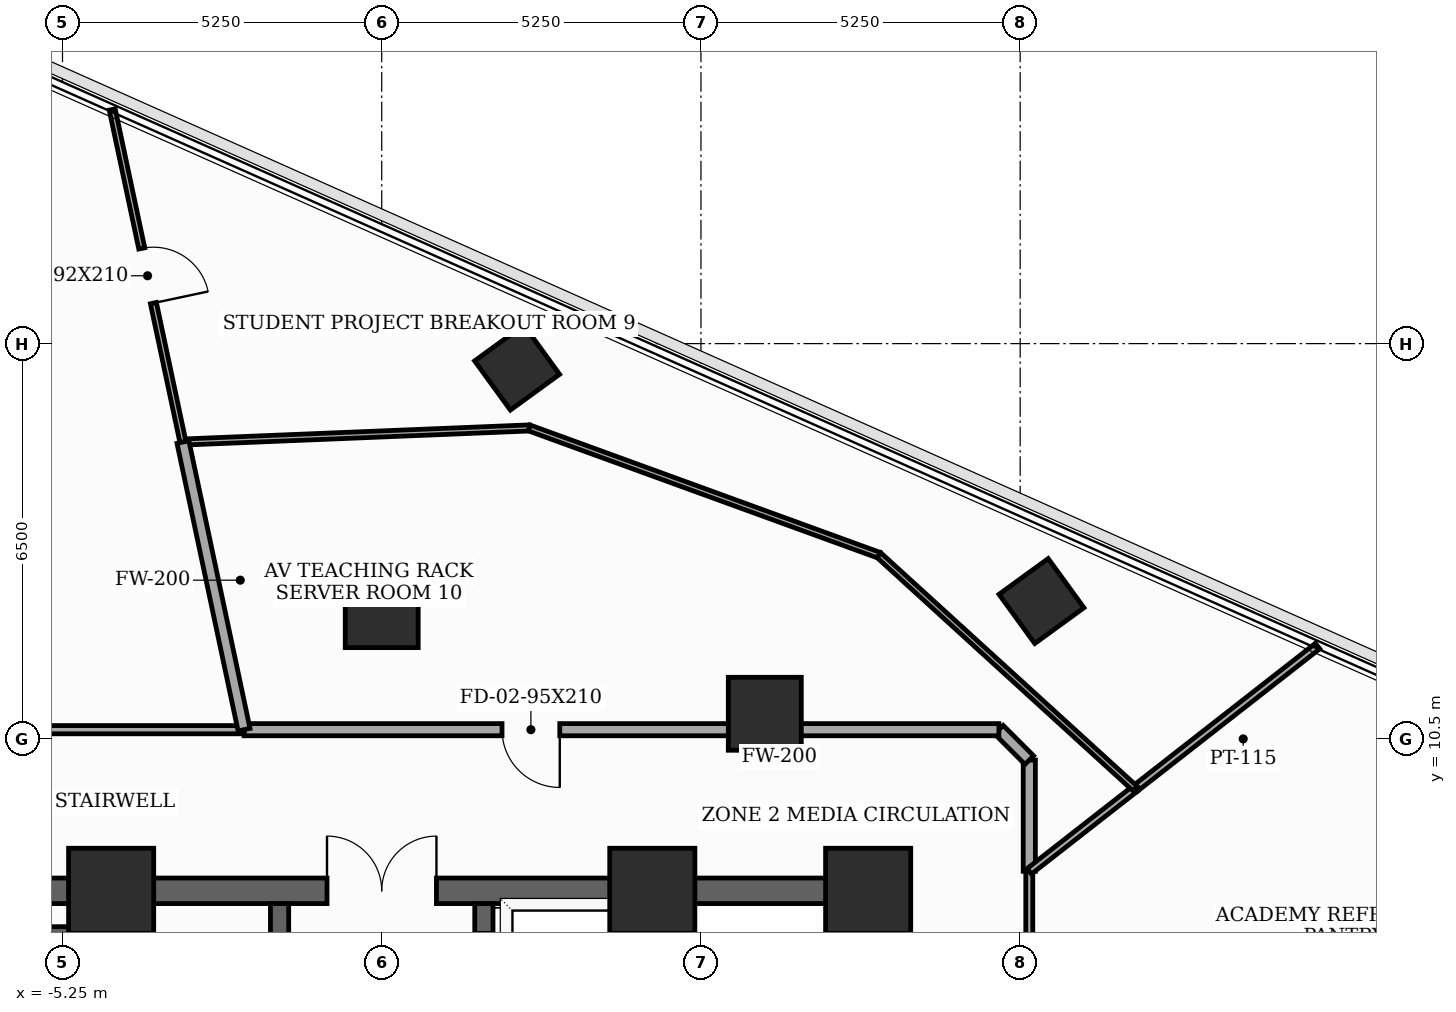
"""IFC4 building model, lengths in metres.
Left out: names, types, materials, properties, quantities, classifications, styles, units other than length and angle.
Written with IfcOpenShell. Run it as: python <this file> out.ifc"""

import sys

from ifc_helpers import new_model, si_unit, direction, frame, frame_2d, origin, origin_2d, place, context, subcontext, project, spatial, rectangle, extrude, element, fill, save


model = new_model("IFC4")
c1 = context("Model", 3, precision=1e-05, world=origin(), true_north=direction((0.0, 1.0)))
c2 = subcontext(c1, "Body", "Model", "MODEL_VIEW")
j1 = project(units=[si_unit("LENGTHUNIT", "METRE"), si_unit("PLANEANGLEUNIT", "RADIAN")], contexts=[c1])
p1 = place(None, origin())
s1 = spatial("IfcSite", under=j1, at=p1, CompositionType="ELEMENT")
p2 = place(p1, origin())
s2 = spatial("IfcBuilding", under=s1, at=p2, CompositionType="ELEMENT")
p3 = place(p2, frame((0.0, 0.0, 169.4)))
s3 = spatial("IfcBuildingStorey", under=s2, at=p3, CompositionType="ELEMENT", Elevation=169.4)
for number, where, z_axis, x_axis in (
    (1, (8.0, 8.0, 0.0), (0.0, 0.0, 1.0), (1.0, 0.0, 0.0)),
    (2, (4.45, 8.0, 0.0), (0.0, 0.0, 1.0), (1.0, 0.0, 0.0)),
    (3, (-4.45, 8.0, 0.0), (0.0, 0.0, 1.0), (1.0, 0.0, 0.0)),
):
    element("IfcColumn", number, at=place(p3, frame(where, z_axis=z_axis, x_axis=x_axis)), inside=s3, PredefinedType="COLUMN", context=c2, shape_type="SweptSolid", body=[
        extrude(rectangle(XDim=1.4, YDim=1.4, at=origin_2d()), origin(), (0.0, 0.0, 1.0), 3.7),
    ])
for number, where, z_axis, x_axis in (
    (4, (6.3, 10.912, 0.0), (0.0, 0.0, 1.0), (1.0, 0.0, 0.0)),
    (5, (0.0, 12.6, 0.0), (0.0, 0.0, 1.0), (1.0, 0.0, 0.0)),
):
    element("IfcColumn", number, at=place(p3, frame(where, z_axis=z_axis, x_axis=x_axis)), inside=s3, PredefinedType="COLUMN", context=c2, shape_type="SweptSolid", body=[
        extrude(rectangle(XDim=1.2, YDim=1.2, at=origin_2d()), origin(), (0.0, 0.0, 1.0), 3.7),
    ])
for number, where, z_axis, x_axis in (
    (6, (10.85, 12.766, 0.0), (0.0, 0.0, 1.0), (0.809, 0.588, 0.0)),
    (7, (2.227, 16.605, 0.0), (0.0, 0.0, 1.0), (0.809, 0.588, 0.0)),
):
    element("IfcColumn", number, at=place(p3, frame(where, z_axis=z_axis, x_axis=x_axis)), inside=s3, PredefinedType="COLUMN", context=c2, shape_type="SweptSolid", body=[
        extrude(rectangle(XDim=1.0, YDim=1.0, at=origin_2d()), origin(), (0.0, 0.0, 1.0), 3.7),
    ])
p4 = place(p3, frame((8.0, -8.0, 0.0), z_axis=(0.0, 0.0, 1.0), x_axis=(0.0, 1.0, 0.0)))
e8 = element("IfcWall", 8, at=p4, inside=s3, PredefinedType="SHEAR", context=c2, shape_type="SweptSolid", body=[
    extrude(rectangle(XDim=16.0, YDim=0.42, at=frame_2d((8.0, 0.0))), origin(), (0.0, 0.0, 1.0), 3.5),
])
p5 = place(p4, frame((9.6, 0.0, 0.0)))
e9 = element("IfcOpeningElement", 9, at=p5, cuts=e8, PredefinedType="OPENING", context=c2, shape_type="SweptSolid", body=[
    extrude(rectangle(XDim=1.05, YDim=2.15, at=frame_2d((0.525, 1.075))), frame((0.0, 0.22, 0.0), z_axis=(0.0, -1.0, 0.0), x_axis=(1.0, 0.0, 0.0)), (0.0, 0.0, 1.0), 0.44),
])
p6 = place(p4, frame((14.229, 0.0, 0.0)))
e10 = element("IfcOpeningElement", 10, at=p6, cuts=e8, PredefinedType="OPENING", context=c2, shape_type="SweptSolid", body=[
    extrude(rectangle(XDim=0.85, YDim=2.02, at=frame_2d((0.425, 1.01))), frame((0.0, 0.22, 0.0), z_axis=(0.0, -1.0, 0.0), x_axis=(1.0, 0.0, 0.0)), (0.0, 0.0, 1.0), 0.44),
])
p7 = place(p3, frame((-8.0, 8.0, 0.0), z_axis=(0.0, 0.0, 1.0), x_axis=(1.0, 0.0, 0.0)))
e11 = element("IfcWall", 11, at=p7, inside=s3, PredefinedType="SHEAR", context=c2, shape_type="SweptSolid", body=[
    extrude(rectangle(XDim=16.0, YDim=0.42, at=frame_2d((8.0, 0.0))), origin(), (0.0, 0.0, 1.0), 3.5),
])
p8 = place(p7, frame((7.1, 0.0, 0.0)))
e12 = element("IfcOpeningElement", 12, at=p8, cuts=e11, PredefinedType="OPENING", context=c2, shape_type="SweptSolid", body=[
    extrude(rectangle(XDim=1.8, YDim=2.15, at=frame_2d((0.9, 1.075))), frame((0.0, 0.22, 0.0), z_axis=(0.0, -1.0, 0.0), x_axis=(1.0, 0.0, 0.0)), (0.0, 0.0, 1.0), 0.44),
])
for number, where, z_axis, x_axis in (
    (13, (-4.45, -7.79, 0.0), (0.0, 0.0, 1.0), (0.0, 1.0, 0.0)),
    (14, (4.45, -7.79, 0.0), (0.0, 0.0, 1.0), (0.0, 1.0, 0.0)),
):
    element("IfcWall", number, at=place(p3, frame(where, z_axis=z_axis, x_axis=x_axis)), inside=s3, PredefinedType="SHEAR", context=c2, shape_type="SweptSolid", body=[
        extrude(rectangle(XDim=15.58, YDim=0.3, at=frame_2d((7.79, 0.0))), origin(), (0.0, 0.0, 1.0), 3.5),
    ])
p9 = place(p3, frame((-7.79, 7.26, 0.0), z_axis=(0.0, 0.0, 1.0), x_axis=(1.0, 0.0, 0.0)))
e15 = element("IfcWall", 15, at=p9, inside=s3, PredefinedType="SHEAR", context=c2, shape_type="SweptSolid", body=[
    extrude(rectangle(XDim=3.34, YDim=0.3, at=frame_2d((1.67, 0.0))), origin(), (0.0, 0.0, 1.0), 3.5),
])
p10 = place(p3, frame((-1.68, -4.85, 0.0), z_axis=(0.0, 0.0, 1.0), x_axis=(0.0, 1.0, 0.0)))
e16 = element("IfcWall", 16, at=p10, inside=s3, PredefinedType="SHEAR", context=c2, shape_type="SweptSolid", body=[
    extrude(rectangle(XDim=12.64, YDim=0.3, at=frame_2d((6.32, 0.0))), origin(), (0.0, 0.0, 1.0), 3.5),
])
p11 = place(p10, frame((3.5, 0.0, 0.0)))
e17 = element("IfcOpeningElement", 17, at=p11, cuts=e16, PredefinedType="OPENING", context=c2, shape_type="SweptSolid", body=[
    extrude(rectangle(XDim=0.95, YDim=2.1, at=frame_2d((0.475, 1.05))), frame((0.0, 0.16, 0.0), z_axis=(0.0, -1.0, 0.0), x_axis=(1.0, 0.0, 0.0)), (0.0, 0.0, 1.0), 0.32),
])
p12 = place(p10, frame((9.8, 0.0, 0.0)))
e18 = element("IfcOpeningElement", 18, at=p12, cuts=e16, PredefinedType="OPENING", context=c2, shape_type="SweptSolid", body=[
    extrude(rectangle(XDim=0.95, YDim=2.1, at=frame_2d((0.475, 1.05))), frame((0.0, 0.16, 0.0), z_axis=(0.0, -1.0, 0.0), x_axis=(1.0, 0.0, 0.0)), (0.0, 0.0, 1.0), 0.32),
])
p13 = place(p3, frame((1.68, -4.85, 0.0), z_axis=(0.0, 0.0, 1.0), x_axis=(0.0, 1.0, 0.0)))
e19 = element("IfcWall", 19, at=p13, inside=s3, PredefinedType="SHEAR", context=c2, shape_type="SweptSolid", body=[
    extrude(rectangle(XDim=12.64, YDim=0.3, at=frame_2d((6.32, 0.0))), origin(), (0.0, 0.0, 1.0), 3.5),
])
p14 = place(p13, frame((0.55, 0.0, 0.0)))
e20 = element("IfcOpeningElement", 20, at=p14, cuts=e19, PredefinedType="OPENING", context=c2, shape_type="SweptSolid", body=[
    extrude(rectangle(XDim=1.1, YDim=2.1, at=frame_2d((0.55, 1.05))), frame((0.0, 0.16, 0.0), z_axis=(0.0, -1.0, 0.0), x_axis=(1.0, 0.0, 0.0)), (0.0, 0.0, 1.0), 0.32),
])
p15 = place(p13, frame((2.65, 0.0, 0.0)))
e21 = element("IfcOpeningElement", 21, at=p15, cuts=e19, PredefinedType="OPENING", context=c2, shape_type="SweptSolid", body=[
    extrude(rectangle(XDim=1.1, YDim=2.1, at=frame_2d((0.55, 1.05))), frame((0.0, 0.16, 0.0), z_axis=(0.0, -1.0, 0.0), x_axis=(1.0, 0.0, 0.0)), (0.0, 0.0, 1.0), 0.32),
])
p16 = place(p13, frame((4.75, 0.0, 0.0)))
e22 = element("IfcOpeningElement", 22, at=p16, cuts=e19, PredefinedType="OPENING", context=c2, shape_type="SweptSolid", body=[
    extrude(rectangle(XDim=1.1, YDim=2.1, at=frame_2d((0.55, 1.05))), frame((0.0, 0.16, 0.0), z_axis=(0.0, -1.0, 0.0), x_axis=(1.0, 0.0, 0.0)), (0.0, 0.0, 1.0), 0.32),
])
p17 = place(p13, frame((6.85, 0.0, 0.0)))
e23 = element("IfcOpeningElement", 23, at=p17, cuts=e19, PredefinedType="OPENING", context=c2, shape_type="SweptSolid", body=[
    extrude(rectangle(XDim=1.1, YDim=2.1, at=frame_2d((0.55, 1.05))), frame((0.0, 0.16, 0.0), z_axis=(0.0, -1.0, 0.0), x_axis=(1.0, 0.0, 0.0)), (0.0, 0.0, 1.0), 0.32),
])
p18 = place(p13, frame((8.95, 0.0, 0.0)))
e24 = element("IfcOpeningElement", 24, at=p18, cuts=e19, PredefinedType="OPENING", context=c2, shape_type="SweptSolid", body=[
    extrude(rectangle(XDim=1.1, YDim=2.1, at=frame_2d((0.55, 1.05))), frame((0.0, 0.16, 0.0), z_axis=(0.0, -1.0, 0.0), x_axis=(1.0, 0.0, 0.0)), (0.0, 0.0, 1.0), 0.32),
])
p19 = place(p13, frame((11.05, 0.0, 0.0)))
e25 = element("IfcOpeningElement", 25, at=p19, cuts=e19, PredefinedType="OPENING", context=c2, shape_type="SweptSolid", body=[
    extrude(rectangle(XDim=1.1, YDim=2.1, at=frame_2d((0.55, 1.05))), frame((0.0, 0.16, 0.0), z_axis=(0.0, -1.0, 0.0), x_axis=(1.0, 0.0, 0.0)), (0.0, 0.0, 1.0), 0.32),
])
p20 = place(p3, frame((10.65, 2.264, 0.0), z_axis=(0.0, 0.0, 1.0), x_axis=(0.0, 1.0, 0.0)))
e26 = element("IfcWall", 26, at=p20, inside=s3, PredefinedType="PARTITIONING", context=c2, shape_type="SweptSolid", body=[
    extrude(rectangle(XDim=6.057, YDim=0.115, at=frame_2d((3.029, 0.0))), origin(), (0.0, 0.0, 1.0), 2.885),
])
p21 = place(p20, frame((0.736, 0.0, 0.0)))
e27 = element("IfcOpeningElement", 27, at=p21, cuts=e26, PredefinedType="OPENING", context=c2, shape_type="SweptSolid", body=[
    extrude(rectangle(XDim=0.95, YDim=2.1, at=frame_2d((0.475, 1.05))), frame((0.0, 0.067, 0.0), z_axis=(0.0, -1.0, 0.0), x_axis=(1.0, 0.0, 0.0)), (0.0, 0.0, 1.0), 0.135),
])
p22 = place(p3, frame((10.65, 8.321, 0.0), z_axis=(0.0, 0.0, 1.0), x_axis=(0.0, 1.0, 0.0)))
e28 = element("IfcWall", 28, at=p22, inside=s3, PredefinedType="SOLIDWALL", context=c2, shape_type="SweptSolid", body=[
    extrude(rectangle(XDim=1.829, YDim=0.2, at=frame_2d((0.915, 0.0))), origin(), (0.0, 0.0, 1.0), 3.5),
])
p23 = place(p3, frame((10.65, 10.15, 0.0), z_axis=(0.0, 0.0, 1.0), x_axis=(-0.707106781187, 0.707106781187, 0.0)))
e29 = element("IfcWall", 29, at=p23, inside=s3, PredefinedType="SOLIDWALL", context=c2, shape_type="SweptSolid", body=[
    extrude(rectangle(XDim=0.707, YDim=0.2, at=frame_2d((0.354, 0.0))), origin(), (0.0, 0.0, 1.0), 3.5),
])
p24 = place(p3, frame((10.15, 10.65, 0.0), z_axis=(0.0, 0.0, 1.0), x_axis=(-1.0, 0.0, 0.0)))
e30 = element("IfcWall", 30, at=p24, inside=s3, PredefinedType="SOLIDWALL", context=c2, shape_type="SweptSolid", body=[
    extrude(rectangle(XDim=12.414, YDim=0.2, at=frame_2d((6.207, 0.0))), origin(), (0.0, 0.0, 1.0), 2.885),
])
p25 = place(p24, frame((7.222, 0.0, 0.0)))
e31 = element("IfcOpeningElement", 31, at=p25, cuts=e30, PredefinedType="OPENING", context=c2, shape_type="SweptSolid", body=[
    extrude(rectangle(XDim=0.95, YDim=2.1, at=frame_2d((0.475, 1.05))), frame((0.0, 0.11, 0.0), z_axis=(0.0, -1.0, 0.0), x_axis=(1.0, 0.0, 0.0)), (0.0, 0.0, 1.0), 0.22),
])
p26 = place(p3, frame((-2.264, 10.65, 0.0), z_axis=(0.0, 0.0, 1.0), x_axis=(-1.0, 0.0, 0.0)))
e32 = element("IfcWall", 32, at=p26, inside=s3, PredefinedType="PARTITIONING", context=c2, shape_type="SweptSolid", body=[
    extrude(rectangle(XDim=7.886, YDim=0.135, at=frame_2d((3.943, 0.0))), origin(), (0.0, 0.0, 1.0), 2.885),
])
p27 = place(p3, frame((15.391, 12.025, 0.0), z_axis=(0.0, 0.0, 1.0), x_axis=(-0.787968951689, -0.615714975597, 0.0)))
e33 = element("IfcWall", 33, at=p27, inside=s3, PredefinedType="PARTITIONING", context=c2, shape_type="SweptSolid", body=[
    extrude(rectangle(XDim=3.807, YDim=0.115, at=frame_2d((1.903, 0.0))), origin(), (0.0, 0.0, 1.0), 2.985),
])
p28 = place(p3, frame((12.391, 9.681, 0.0), z_axis=(0.0, 0.0, 1.0), x_axis=(-0.788124883644, -0.615515367624, 0.0)))
e34 = element("IfcWall", 34, at=p28, inside=s3, PredefinedType="PARTITIONING", context=c2, shape_type="SweptSolid", body=[
    extrude(rectangle(XDim=2.209, YDim=0.115, at=frame_2d((1.104, 0.0))), origin(), (0.0, 0.0, 1.0), 3.5),
])
p29 = place(p3, frame((-3.269, 15.381, 0.0), z_axis=(0.0, 0.0, 1.0), x_axis=(0.999171753478, 0.040691609114, 0.0)))
e35 = element("IfcWall", 35, at=p29, inside=s3, PredefinedType="MOVABLE", context=c2, shape_type="SweptSolid", body=[
    extrude(rectangle(XDim=5.7, YDim=0.1, at=frame_2d((2.85, 0.0))), origin(), (0.0, 0.0, 1.0), 2.885),
])
p30 = place(p3, frame((2.426, 15.613, 0.0), z_axis=(0.0, 0.0, 1.0), x_axis=(0.939701375228, -0.341996089736, 0.0)))
e36 = element("IfcWall", 36, at=p30, inside=s3, PredefinedType="MOVABLE", context=c2, shape_type="SweptSolid", body=[
    extrude(rectangle(XDim=6.12, YDim=0.1, at=frame_2d((3.06, 0.0))), origin(), (0.0, 0.0, 1.0), 3.5),
])
p31 = place(p3, frame((8.177, 13.52, 0.0), z_axis=(0.0, 0.0, 1.0), x_axis=(0.739232344885, -0.673450473514, 0.0)))
e37 = element("IfcWall", 37, at=p31, inside=s3, PredefinedType="MOVABLE", context=c2, shape_type="SweptSolid", body=[
    extrude(rectangle(XDim=5.701, YDim=0.1, at=frame_2d((2.85, 0.0))), origin(), (0.0, 0.0, 1.0), 2.885),
])
p32 = place(p3, frame((-4.432, 20.851, 0.0), z_axis=(0.0, 0.0, 1.0), x_axis=(0.208032106743, -0.978121997792, 0.0)))
e38 = element("IfcWall", 38, at=p32, inside=s3, PredefinedType="MOVABLE", context=c2, shape_type="SweptSolid", body=[
    extrude(rectangle(XDim=5.592, YDim=0.1, at=frame_2d((2.796, 0.0))), origin(), (0.0, 0.0, 1.0), 2.985),
])
p33 = place(p32, frame((2.336, 0.0, 0.0)))
e39 = element("IfcOpeningElement", 39, at=p33, cuts=e38, PredefinedType="OPENING", context=c2, shape_type="SweptSolid", body=[
    extrude(rectangle(XDim=0.92, YDim=2.1, at=frame_2d((0.46, 1.05))), frame((0.0, 0.06, 0.0), z_axis=(0.0, -1.0, 0.0), x_axis=(1.0, 0.0, 0.0)), (0.0, 0.0, 1.0), 0.12),
])
p34 = place(p3, frame((-3.269, 15.381, 0.0), z_axis=(0.0, 0.0, 1.0), x_axis=(0.207808649559, -0.978169497157, 0.0)))
e40 = element("IfcWall", 40, at=p34, inside=s3, PredefinedType="SOLIDWALL", context=c2, shape_type="SweptSolid", body=[
    extrude(rectangle(XDim=4.837, YDim=0.2, at=frame_2d((2.418, 0.0))), origin(), (0.0, 0.0, 1.0), 2.885),
])
p35 = place(p8, origin())
e41 = element("IfcDoor", 41, at=p35, inside=s3, OperationType="DOUBLE_DOOR_SINGLE_SWING", PredefinedType="DOOR", context=c2, shape_type="SweptSolid", body=[
    extrude(rectangle(XDim=1.8, YDim=2.15, at=frame_2d((0.9, 1.075))), frame((0.0, 0.025, 0.0), z_axis=(0.0, -1.0, 0.0), x_axis=(1.0, 0.0, 0.0)), (0.0, 0.0, 1.0), 0.05),
])
fill(e12, e41)
p36 = place(p25, origin())
e42 = element("IfcDoor", 42, at=p36, inside=s3, OperationType="SINGLE_SWING_LEFT", PredefinedType="DOOR", context=c2, shape_type="SweptSolid", body=[
    extrude(rectangle(XDim=0.95, YDim=2.1, at=frame_2d((0.475, 1.05))), frame((0.0, 0.025, 0.0), z_axis=(0.0, -1.0, 0.0), x_axis=(1.0, 0.0, 0.0)), (0.0, 0.0, 1.0), 0.05),
])
fill(e31, e42)
p37 = place(p33, origin())
e43 = element("IfcDoor", 43, at=p37, inside=s3, OperationType="SINGLE_SWING_RIGHT", PredefinedType="DOOR", context=c2, shape_type="SweptSolid", body=[
    extrude(rectangle(XDim=0.92, YDim=2.1, at=frame_2d((0.46, 1.05))), frame((0.0, 0.025, 0.0), z_axis=(0.0, -1.0, 0.0), x_axis=(1.0, 0.0, 0.0)), (0.0, 0.0, 1.0), 0.05),
])
fill(e39, e43)
save(model, sys.argv[1])
